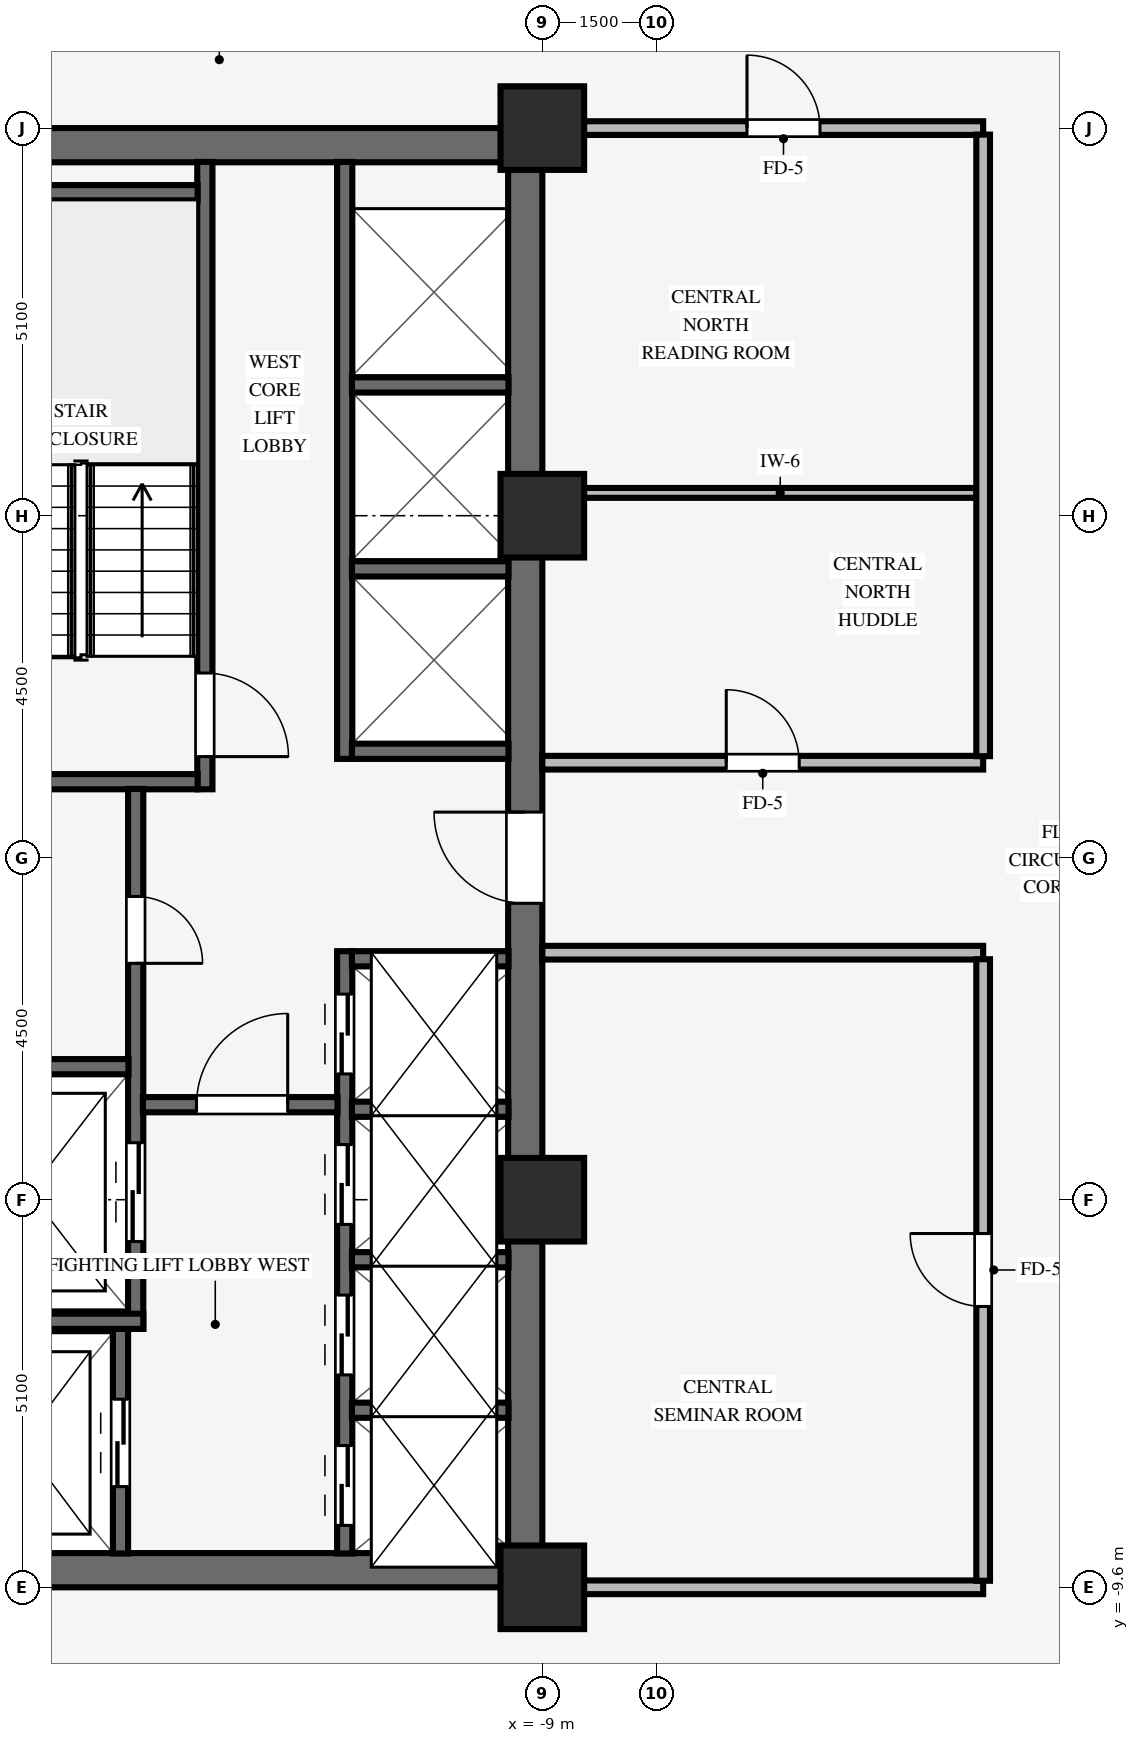
"""IFC4 building model, lengths in metres.
Left out: names, types, materials, properties, quantities, classifications, styles, units other than length and angle.
Written with IfcOpenShell. Run it as: python <this file> out.ifc"""

import sys

from ifc_helpers import new_model, si_unit, direction, frame, frame_2d, origin, origin_2d, place, context, subcontext, project, spatial, rectangle, extrude, source, transform, mapped, element, fill, save


model = new_model("IFC4")
c1 = context("Model", 3, precision=1e-05, world=origin(), true_north=direction((0.0, 1.0)))
c2 = subcontext(c1, "Body", "Model", "MODEL_VIEW")
j1 = project(units=[si_unit("LENGTHUNIT", "METRE"), si_unit("PLANEANGLEUNIT", "RADIAN")], contexts=[c1])
p1 = place(None, origin())
s1 = spatial("IfcSite", under=j1, at=p1, CompositionType="ELEMENT")
p2 = place(p1, origin())
s2 = spatial("IfcBuilding", under=s1, at=p2, CompositionType="ELEMENT")
p3 = place(p2, frame((0.0, 0.0, 71.4)))
s3 = spatial("IfcBuildingStorey", under=s2, at=p3, CompositionType="ELEMENT", Elevation=71.4)
for number, where, z_axis, x_axis in (
    (1, (-17.5, -9.375, 0.0), (0.0, 0.0, 1.0), (1.0, 0.0, 0.0)),
    (2, (-17.5, 9.375, 0.0), (0.0, 0.0, 1.0), (1.0, 0.0, 0.0)),
):
    element("IfcWall", number, at=place(p3, frame(where, z_axis=z_axis, x_axis=x_axis)), inside=s3, PredefinedType="SHEAR", context=c2, shape_type="SweptSolid", body=[
        extrude(rectangle(XDim=8.5, YDim=0.45, at=frame_2d((4.25, 0.0))), origin(), (0.0, 0.0, 1.0), 3.37),
    ])
p4 = place(p3, frame((-9.225, -9.155, 0.0), z_axis=(0.0, 0.0, 1.0), x_axis=(0.0, 1.0, 0.0)))
e3 = element("IfcWall", 3, at=p4, inside=s3, PredefinedType="SHEAR", context=c2, shape_type="SweptSolid", body=[
    extrude(rectangle(XDim=18.31, YDim=0.45, at=frame_2d((9.155, 0.0))), origin(), (0.0, 0.0, 1.0), 3.37),
])
p5 = place(p4, frame((8.555, 0.0, 0.0)))
e4 = element("IfcOpeningElement", 4, at=p5, cuts=e3, PredefinedType="OPENING", context=c2, shape_type="SweptSolid", body=[
    extrude(rectangle(XDim=1.2, YDim=2.15, at=frame_2d((0.6, 1.075))), frame((0.0, 0.235, 0.0), z_axis=(0.0, -1.0, 0.0), x_axis=(1.0, 0.0, 0.0)), (0.0, 0.0, 1.0), 0.47),
])
for number, where, z_axis, x_axis in (
    (5, (-9.0, -9.6, 0.0), (0.0, 0.0, 1.0), (1.0, 0.0, 0.0)),
    (6, (-9.0, -4.5, 0.0), (0.0, 0.0, 1.0), (1.0, 0.0, 0.0)),
    (7, (-9.0, 4.5, 0.0), (0.0, 0.0, 1.0), (1.0, 0.0, 0.0)),
    (8, (-9.0, 9.6, 0.0), (0.0, 0.0, 1.0), (1.0, 0.0, 0.0)),
):
    element("IfcColumn", number, at=place(p3, frame(where, z_axis=z_axis, x_axis=x_axis)), inside=s3, PredefinedType="COLUMN", context=c2, shape_type="SweptSolid", body=[
        extrude(rectangle(XDim=1.1, YDim=1.1, at=origin_2d()), origin(), (0.0, 0.0, 1.0), 3.37),
    ])
p6 = place(p3, frame((-13.44, 0.9, 0.0), z_axis=(0.0, 0.0, 1.0), x_axis=(0.0, 1.0, 0.0)))
e9 = element("IfcWall", 9, at=p6, inside=s3, PredefinedType="SHEAR", context=c2, shape_type="SweptSolid", body=[
    extrude(rectangle(XDim=8.255, YDim=0.2, at=frame_2d((4.127, 0.0))), origin(), (0.0, 0.0, 1.0), 3.37),
])
p7 = place(p6, frame((1.53, 0.0, 0.0), z_axis=(0.0, 0.0, 1.0), x_axis=(-1.0, 0.0, 0.0)))
e10 = element("IfcOpeningElement", 10, at=p7, cuts=e9, PredefinedType="OPENING", context=c2, shape_type="SweptSolid", body=[
    extrude(rectangle(XDim=1.1, YDim=2.15, at=frame_2d((0.55, 1.075))), frame((0.0, 0.11, 0.0), z_axis=(0.0, -1.0, 0.0), x_axis=(1.0, 0.0, 0.0)), (0.0, 0.0, 1.0), 0.22),
])
for number, where, z_axis, x_axis in (
    (11, (-17.055, 1.0, 0.0), (0.0, 0.0, 1.0), (1.0, 0.0, 0.0)),
    (12, (-17.055, 8.75, 0.0), (0.0, 0.0, 1.0), (1.0, 0.0, 0.0)),
):
    element("IfcWall", number, at=place(p3, frame(where, z_axis=z_axis, x_axis=x_axis)), inside=s3, PredefinedType="SHEAR", context=c2, shape_type="SweptSolid", body=[
        extrude(rectangle(XDim=3.52, YDim=0.2, at=frame_2d((1.76, 0.0))), origin(), (0.0, 0.0, 1.0), 3.37),
    ])
p8 = place(p3, frame((-14.55, -9.155, 0.0), z_axis=(0.0, 0.0, 1.0), x_axis=(0.0, 1.0, 0.0)))
e13 = element("IfcWall", 13, at=p8, inside=s3, PredefinedType="SHEAR", context=c2, shape_type="SweptSolid", body=[
    extrude(rectangle(XDim=2.96, YDim=0.2, at=frame_2d((1.48, 0.0))), origin(), (0.0, 0.0, 1.0), 3.37),
])
p9 = place(p8, frame((0.88, 0.0, 0.0)))
e14 = element("IfcOpeningElement", 14, at=p9, cuts=e13, PredefinedType="OPENING", context=c2, shape_type="SweptSolid", body=[
    extrude(rectangle(XDim=1.15, YDim=2.15, at=frame_2d((0.575, 1.075))), frame((0.0, 0.11, 0.0), z_axis=(0.0, -1.0, 0.0), x_axis=(1.0, 0.0, 0.0)), (0.0, 0.0, 1.0), 0.22),
])
p10 = place(p3, frame((-14.35, -6.2, 0.0), z_axis=(0.0, 0.0, 1.0), x_axis=(0.0, 1.0, 0.0)))
e15 = element("IfcWall", 15, at=p10, inside=s3, PredefinedType="SHEAR", context=c2, shape_type="SweptSolid", body=[
    extrude(rectangle(XDim=7.105, YDim=0.2, at=frame_2d((3.552, 0.0))), origin(), (0.0, 0.0, 1.0), 3.37),
])
p11 = place(p10, frame((5.69, 0.0, 0.0), z_axis=(0.0, 0.0, 1.0), x_axis=(-1.0, 0.0, 0.0)))
e16 = element("IfcOpeningElement", 16, at=p11, cuts=e15, PredefinedType="OPENING", context=c2, shape_type="SweptSolid", body=[
    extrude(rectangle(XDim=0.88, YDim=2.1, at=frame_2d((0.44, 1.05))), frame((0.0, 0.11, 0.0), z_axis=(0.0, -1.0, 0.0), x_axis=(1.0, 0.0, 0.0)), (0.0, 0.0, 1.0), 0.22),
])
p12 = place(p10, frame((1.15, 0.0, 0.0)))
e17 = element("IfcOpeningElement", 17, at=p12, cuts=e15, PredefinedType="OPENING", context=c2, shape_type="SweptSolid", body=[
    extrude(rectangle(XDim=1.3, YDim=2.2, at=frame_2d((0.65, 1.1))), frame((0.0, 0.11, 0.0), z_axis=(0.0, -1.0, 0.0), x_axis=(1.0, 0.0, 0.0)), (0.0, 0.0, 1.0), 0.22),
])
p13 = place(p3, frame((-17.055, -6.1, 0.0), z_axis=(0.0, 0.0, 1.0), x_axis=(1.0, 0.0, 0.0)))
e18 = element("IfcWall", 18, at=p13, inside=s3, PredefinedType="SHEAR", context=c2, shape_type="SweptSolid", body=[
    extrude(rectangle(XDim=2.805, YDim=0.2, at=frame_2d((1.402, 0.0))), origin(), (0.0, 0.0, 1.0), 3.37),
])
p14 = place(p3, frame((-17.055, -2.75, 0.0), z_axis=(0.0, 0.0, 1.0), x_axis=(1.0, 0.0, 0.0)))
e19 = element("IfcWall", 19, at=p14, inside=s3, PredefinedType="SHEAR", context=c2, shape_type="SweptSolid", body=[
    extrude(rectangle(XDim=2.61, YDim=0.2, at=frame_2d((1.305, 0.0))), origin(), (0.0, 0.0, 1.0), 3.37),
])
p15 = place(p3, frame((-11.6, -9.155, 0.0), z_axis=(0.0, 0.0, 1.0), x_axis=(0.0, 1.0, 0.0)))
e20 = element("IfcWall", 20, at=p15, inside=s3, PredefinedType="SHEAR", context=c2, shape_type="SweptSolid", body=[
    extrude(rectangle(XDim=7.925, YDim=0.2, at=frame_2d((3.962, 0.0))), origin(), (0.0, 0.0, 1.0), 3.37),
])
p16 = place(p15, frame((0.37, 0.0, 0.0)))
e21 = element("IfcOpeningElement", 21, at=p16, cuts=e20, PredefinedType="OPENING", context=c2, shape_type="SweptSolid", body=[
    extrude(rectangle(XDim=1.05, YDim=2.15, at=frame_2d((0.525, 1.075))), frame((0.0, 0.11, 0.0), z_axis=(0.0, -1.0, 0.0), x_axis=(1.0, 0.0, 0.0)), (0.0, 0.0, 1.0), 0.22),
])
p17 = place(p15, frame((2.35, 0.0, 0.0)))
e22 = element("IfcOpeningElement", 22, at=p17, cuts=e20, PredefinedType="OPENING", context=c2, shape_type="SweptSolid", body=[
    extrude(rectangle(XDim=1.05, YDim=2.15, at=frame_2d((0.525, 1.075))), frame((0.0, 0.11, 0.0), z_axis=(0.0, -1.0, 0.0), x_axis=(1.0, 0.0, 0.0)), (0.0, 0.0, 1.0), 0.22),
])
p18 = place(p15, frame((4.33, 0.0, 0.0)))
e23 = element("IfcOpeningElement", 23, at=p18, cuts=e20, PredefinedType="OPENING", context=c2, shape_type="SweptSolid", body=[
    extrude(rectangle(XDim=1.05, YDim=2.15, at=frame_2d((0.525, 1.075))), frame((0.0, 0.11, 0.0), z_axis=(0.0, -1.0, 0.0), x_axis=(1.0, 0.0, 0.0)), (0.0, 0.0, 1.0), 0.22),
])
p19 = place(p15, frame((6.31, 0.0, 0.0)))
e24 = element("IfcOpeningElement", 24, at=p19, cuts=e20, PredefinedType="OPENING", context=c2, shape_type="SweptSolid", body=[
    extrude(rectangle(XDim=1.05, YDim=2.15, at=frame_2d((0.525, 1.075))), frame((0.0, 0.11, 0.0), z_axis=(0.0, -1.0, 0.0), x_axis=(1.0, 0.0, 0.0)), (0.0, 0.0, 1.0), 0.22),
])
p20 = place(p3, frame((-14.255, -3.25, 0.0), z_axis=(0.0, 0.0, 1.0), x_axis=(1.0, 0.0, 0.0)))
e25 = element("IfcWall", 25, at=p20, inside=s3, PredefinedType="SHEAR", context=c2, shape_type="SweptSolid", body=[
    extrude(rectangle(XDim=2.56, YDim=0.2, at=frame_2d((1.28, 0.0))), origin(), (0.0, 0.0, 1.0), 3.37),
])
p21 = place(p20, frame((0.705, 0.0, 0.0)))
e26 = element("IfcOpeningElement", 26, at=p21, cuts=e25, PredefinedType="OPENING", context=c2, shape_type="SweptSolid", body=[
    extrude(rectangle(XDim=1.2, YDim=2.15, at=frame_2d((0.6, 1.075))), frame((0.0, 0.11, 0.0), z_axis=(0.0, -1.0, 0.0), x_axis=(1.0, 0.0, 0.0)), (0.0, 0.0, 1.0), 0.22),
])
for number, where, z_axis, x_axis in (
    (27, (-11.505, -7.27, 0.0), (0.0, 0.0, 1.0), (1.0, 0.0, 0.0)),
    (28, (-11.505, -5.29, 0.0), (0.0, 0.0, 1.0), (1.0, 0.0, 0.0)),
    (29, (-11.505, -3.31, 0.0), (0.0, 0.0, 1.0), (1.0, 0.0, 0.0)),
    (30, (-11.505, -1.33, 0.0), (0.0, 0.0, 1.0), (1.0, 0.0, 0.0)),
):
    element("IfcWall", number, at=place(p3, frame(where, z_axis=z_axis, x_axis=x_axis)), inside=s3, PredefinedType="SHEAR", context=c2, shape_type="SweptSolid", body=[
        extrude(rectangle(XDim=2.06, YDim=0.2, at=frame_2d((1.03, 0.0))), origin(), (0.0, 0.0, 1.0), 3.37),
    ])
p22 = place(p3, frame((-11.6, 1.3, 0.0), z_axis=(0.0, 0.0, 1.0), x_axis=(0.0, 1.0, 0.0)))
e31 = element("IfcWall", 31, at=p22, inside=s3, PredefinedType="SHEAR", context=c2, shape_type="SweptSolid", body=[
    extrude(rectangle(XDim=7.855, YDim=0.2, at=frame_2d((3.927, 0.0))), origin(), (0.0, 0.0, 1.0), 3.37),
])
for number, where, z_axis, x_axis in (
    (32, (-11.505, 1.4, 0.0), (0.0, 0.0, 1.0), (1.0, 0.0, 0.0)),
    (33, (-11.505, 3.8, 0.0), (0.0, 0.0, 1.0), (1.0, 0.0, 0.0)),
    (34, (-11.505, 6.22, 0.0), (0.0, 0.0, 1.0), (1.0, 0.0, 0.0)),
):
    element("IfcWall", number, at=place(p3, frame(where, z_axis=z_axis, x_axis=x_axis)), inside=s3, PredefinedType="SHEAR", context=c2, shape_type="SweptSolid", body=[
        extrude(rectangle(XDim=2.06, YDim=0.2, at=frame_2d((1.03, 0.0))), origin(), (0.0, 0.0, 1.0), 3.37),
    ])
p23 = place(p3, frame((-8.454, -9.6, 0.0), z_axis=(0.0, 0.0, 1.0), x_axis=(1.0, 0.0, 0.0)))
e35 = element("IfcWall", 35, at=p23, inside=s3, PredefinedType="PARTITIONING", context=c2, shape_type="SweptSolid", body=[
    extrude(rectangle(XDim=5.254, YDim=0.18, at=frame_2d((2.627, 0.0))), origin(), (0.0, 0.0, 1.0), 2.405),
])
p24 = place(p3, frame((-9.0, -1.25, 0.0), z_axis=(0.0, 0.0, 1.0), x_axis=(1.0, 0.0, 0.0)))
e36 = element("IfcWall", 36, at=p24, inside=s3, PredefinedType="PARTITIONING", context=c2, shape_type="SweptSolid", body=[
    extrude(rectangle(XDim=5.8, YDim=0.18, at=frame_2d((2.9, 0.0))), origin(), (0.0, 0.0, 1.0), 3.36),
])
p25 = place(p3, frame((-9.0, 1.25, 0.0), z_axis=(0.0, 0.0, 1.0), x_axis=(1.0, 0.0, 0.0)))
e37 = element("IfcWall", 37, at=p25, inside=s3, PredefinedType="PARTITIONING", context=c2, shape_type="SweptSolid", body=[
    extrude(rectangle(XDim=5.8, YDim=0.18, at=frame_2d((2.9, 0.0))), origin(), (0.0, 0.0, 1.0), 3.36),
])
p26 = place(p25, frame((2.42, 0.0, 0.0)))
e38 = element("IfcOpeningElement", 38, at=p26, cuts=e37, PredefinedType="OPENING", context=c2, shape_type="SweptSolid", body=[
    extrude(rectangle(XDim=0.96, YDim=2.1, at=frame_2d((0.48, 1.05))), frame((0.0, 0.1, 0.0), z_axis=(0.0, -1.0, 0.0), x_axis=(1.0, 0.0, 0.0)), (0.0, 0.0, 1.0), 0.2),
])
p27 = place(p3, frame((-8.454, 4.8, 0.0), z_axis=(0.0, 0.0, 1.0), x_axis=(1.0, 0.0, 0.0)))
e39 = element("IfcWall", 39, at=p27, inside=s3, PredefinedType="PARTITIONING", context=c2, shape_type="SweptSolid", body=[
    extrude(rectangle(XDim=5.168, YDim=0.13, at=frame_2d((2.584, 0.0))), origin(), (0.0, 0.0, 1.0), 2.738),
])
p28 = place(p3, frame((-8.454, 9.6, 0.0), z_axis=(0.0, 0.0, 1.0), x_axis=(1.0, 0.0, 0.0)))
e40 = element("IfcWall", 40, at=p28, inside=s3, PredefinedType="PARTITIONING", context=c2, shape_type="SweptSolid", body=[
    extrude(rectangle(XDim=5.254, YDim=0.18, at=frame_2d((2.627, 0.0))), origin(), (0.0, 0.0, 1.0), 2.405),
])
p29 = place(p28, frame((2.147, 0.0, 0.0)))
e41 = element("IfcOpeningElement", 41, at=p29, cuts=e40, PredefinedType="OPENING", context=c2, shape_type="SweptSolid", body=[
    extrude(rectangle(XDim=0.96, YDim=2.1, at=frame_2d((0.48, 1.05))), frame((0.0, 0.1, 0.0), z_axis=(0.0, -1.0, 0.0), x_axis=(1.0, 0.0, 0.0)), (0.0, 0.0, 1.0), 0.2),
])
p30 = place(p3, frame((-3.2, -9.514, 0.0), z_axis=(0.0, 0.0, 1.0), x_axis=(0.0, 1.0, 0.0)))
e42 = element("IfcWall", 42, at=p30, inside=s3, PredefinedType="PARTITIONING", context=c2, shape_type="SweptSolid", body=[
    extrude(rectangle(XDim=8.178, YDim=0.18, at=frame_2d((4.089, 0.0))), origin(), (0.0, 0.0, 1.0), 3.36),
])
p31 = place(p30, frame((3.609, 0.0, 0.0)))
e43 = element("IfcOpeningElement", 43, at=p31, cuts=e42, PredefinedType="OPENING", context=c2, shape_type="SweptSolid", body=[
    extrude(rectangle(XDim=0.96, YDim=2.1, at=frame_2d((0.48, 1.05))), frame((0.0, 0.1, 0.0), z_axis=(0.0, -1.0, 0.0), x_axis=(1.0, 0.0, 0.0)), (0.0, 0.0, 1.0), 0.2),
])
p32 = place(p3, frame((-3.2, 1.336, 0.0), z_axis=(0.0, 0.0, 1.0), x_axis=(0.0, 1.0, 0.0)))
e44 = element("IfcWall", 44, at=p32, inside=s3, PredefinedType="PARTITIONING", context=c2, shape_type="SweptSolid", body=[
    extrude(rectangle(XDim=8.178, YDim=0.18, at=frame_2d((4.089, 0.0))), origin(), (0.0, 0.0, 1.0), 3.36),
])
m1 = source(origin(), c2, "Body", "SweptSolid", [
    extrude(rectangle(XDim=1.1, YDim=2.15, at=frame_2d((0.55, 1.075))), frame((0.0, 0.025, 0.0), z_axis=(0.0, -1.0, 0.0), x_axis=(1.0, 0.0, 0.0)), (0.0, 0.0, 1.0), 0.05),
])
p33 = place(p7, origin())
e45 = element("IfcDoor", 45, at=p33, inside=s3, OperationType="SINGLE_SWING_RIGHT", PredefinedType="DOOR", context=c2, shape_type="MappedRepresentation", body=[
    mapped(m1, transform((0.0, 0.0, 0.0), scale=1.0)),
])
fill(e10, e45)
m2 = source(origin(), c2, "Body", "SweptSolid", [
    extrude(rectangle(XDim=0.88, YDim=2.1, at=frame_2d((0.44, 1.05))), frame((0.0, 0.025, 0.0), z_axis=(0.0, -1.0, 0.0), x_axis=(1.0, 0.0, 0.0)), (0.0, 0.0, 1.0), 0.05),
])
p34 = place(p11, origin())
e46 = element("IfcDoor", 46, at=p34, inside=s3, OperationType="SINGLE_SWING_RIGHT", PredefinedType="DOOR", context=c2, shape_type="MappedRepresentation", body=[
    mapped(m2, transform((0.0, 0.0, 0.0), scale=1.0)),
])
fill(e16, e46)
m3 = source(origin(), c2, "Body", "SweptSolid", [
    extrude(rectangle(XDim=1.2, YDim=2.15, at=frame_2d((0.6, 1.075))), frame((0.0, 0.025, 0.0), z_axis=(0.0, -1.0, 0.0), x_axis=(1.0, 0.0, 0.0)), (0.0, 0.0, 1.0), 0.05),
])
p35 = place(p21, origin())
e47 = element("IfcDoor", 47, at=p35, inside=s3, OperationType="SINGLE_SWING_RIGHT", PredefinedType="DOOR", context=c2, shape_type="MappedRepresentation", body=[
    mapped(m3, transform((0.0, 0.0, 0.0), scale=1.0)),
])
fill(e26, e47)
p36 = place(p5, origin())
e48 = element("IfcDoor", 48, at=p36, inside=s3, OperationType="SINGLE_SWING_RIGHT", PredefinedType="DOOR", context=c2, shape_type="MappedRepresentation", body=[
    mapped(m3, transform((0.0, 0.0, 0.0), scale=1.0)),
])
fill(e4, e48)
m4 = source(origin(), c2, "Body", "SweptSolid", [
    extrude(rectangle(XDim=1.15, YDim=2.15, at=frame_2d((0.575, 1.075))), frame((0.0, 0.025, 0.0), z_axis=(0.0, -1.0, 0.0), x_axis=(1.0, 0.0, 0.0)), (0.0, 0.0, 1.0), 0.05),
])
p37 = place(p9, origin())
e49 = element("IfcDoor", 49, at=p37, inside=s3, OperationType="DOUBLE_DOOR_SLIDING", PredefinedType="DOOR", context=c2, shape_type="MappedRepresentation", body=[
    mapped(m4, transform((0.0, 0.0, 0.0), scale=1.0)),
])
fill(e14, e49)
m5 = source(origin(), c2, "Body", "SweptSolid", [
    extrude(rectangle(XDim=1.3, YDim=2.2, at=frame_2d((0.65, 1.1))), frame((0.0, 0.025, 0.0), z_axis=(0.0, -1.0, 0.0), x_axis=(1.0, 0.0, 0.0)), (0.0, 0.0, 1.0), 0.05),
])
p38 = place(p12, origin())
e50 = element("IfcDoor", 50, at=p38, inside=s3, OperationType="DOUBLE_DOOR_SLIDING", PredefinedType="DOOR", context=c2, shape_type="MappedRepresentation", body=[
    mapped(m5, transform((0.0, 0.0, 0.0), scale=1.0)),
])
fill(e17, e50)
m6 = source(origin(), c2, "Body", "SweptSolid", [
    extrude(rectangle(XDim=1.05, YDim=2.15, at=frame_2d((0.525, 1.075))), frame((0.0, 0.025, 0.0), z_axis=(0.0, -1.0, 0.0), x_axis=(1.0, 0.0, 0.0)), (0.0, 0.0, 1.0), 0.05),
])
p39 = place(p16, origin())
e51 = element("IfcDoor", 51, at=p39, inside=s3, OperationType="DOUBLE_DOOR_SLIDING", PredefinedType="DOOR", context=c2, shape_type="MappedRepresentation", body=[
    mapped(m6, transform((0.0, 0.0, 0.0), scale=1.0)),
])
fill(e21, e51)
p40 = place(p17, origin())
e52 = element("IfcDoor", 52, at=p40, inside=s3, OperationType="DOUBLE_DOOR_SLIDING", PredefinedType="DOOR", context=c2, shape_type="MappedRepresentation", body=[
    mapped(m6, transform((0.0, 0.0, 0.0), scale=1.0)),
])
fill(e22, e52)
p41 = place(p18, origin())
e53 = element("IfcDoor", 53, at=p41, inside=s3, OperationType="DOUBLE_DOOR_SLIDING", PredefinedType="DOOR", context=c2, shape_type="MappedRepresentation", body=[
    mapped(m6, transform((0.0, 0.0, 0.0), scale=1.0)),
])
fill(e23, e53)
p42 = place(p19, origin())
e54 = element("IfcDoor", 54, at=p42, inside=s3, OperationType="DOUBLE_DOOR_SLIDING", PredefinedType="DOOR", context=c2, shape_type="MappedRepresentation", body=[
    mapped(m6, transform((0.0, 0.0, 0.0), scale=1.0)),
])
fill(e24, e54)
m7 = source(origin(), c2, "Body", "SweptSolid", [
    extrude(rectangle(XDim=0.96, YDim=2.1, at=frame_2d((0.48, 1.05))), frame((0.0, 0.025, 0.0), z_axis=(0.0, -1.0, 0.0), x_axis=(1.0, 0.0, 0.0)), (0.0, 0.0, 1.0), 0.05),
])
p43 = place(p31, origin())
e55 = element("IfcDoor", 55, at=p43, inside=s3, OperationType="SINGLE_SWING_RIGHT", PredefinedType="DOOR", context=c2, shape_type="MappedRepresentation", body=[
    mapped(m7, transform((0.0, 0.0, 0.0), scale=1.0)),
])
fill(e43, e55)
p44 = place(p26, origin())
e56 = element("IfcDoor", 56, at=p44, inside=s3, OperationType="SINGLE_SWING_LEFT", PredefinedType="DOOR", context=c2, shape_type="MappedRepresentation", body=[
    mapped(m7, transform((0.0, 0.0, 0.0), scale=1.0)),
])
fill(e38, e56)
p45 = place(p29, origin())
e57 = element("IfcDoor", 57, at=p45, inside=s3, OperationType="SINGLE_SWING_LEFT", PredefinedType="DOOR", context=c2, shape_type="MappedRepresentation", body=[
    mapped(m7, transform((0.0, 0.0, 0.0), scale=1.0)),
])
fill(e41, e57)
save(model, sys.argv[1])
